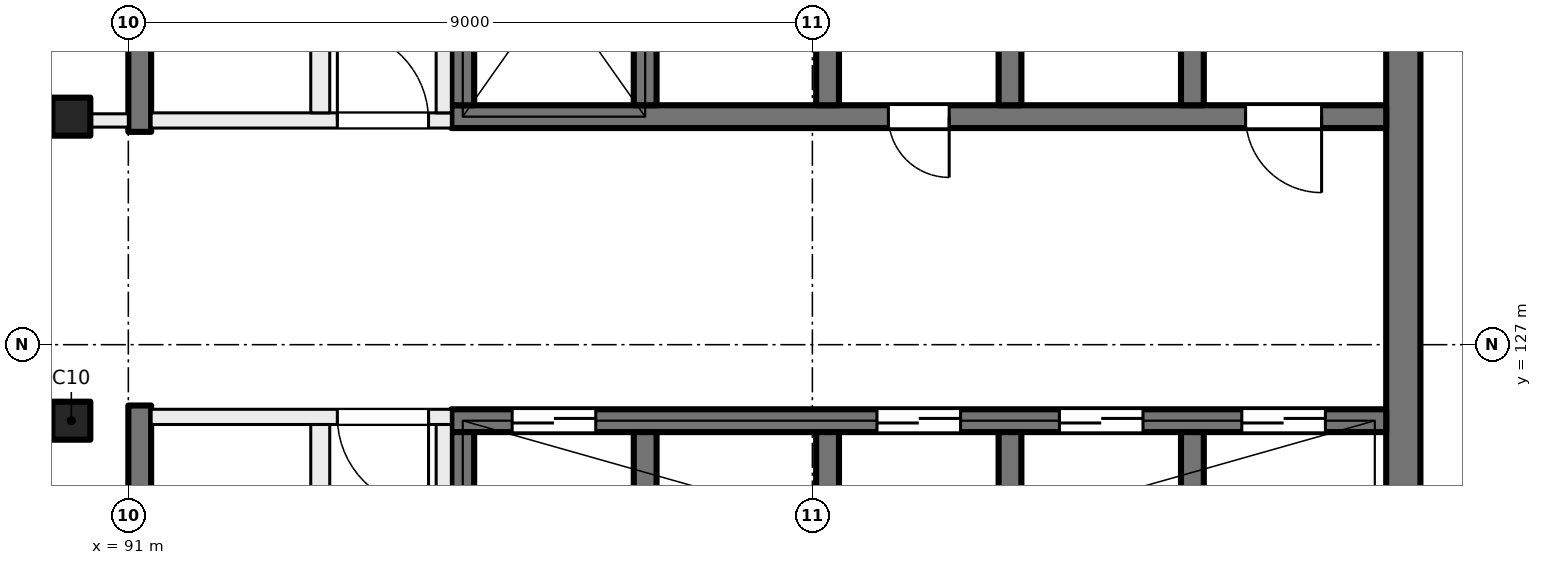
"""IFC4 building model, lengths in metres.
Left out: names, types, materials, properties, quantities, classifications, styles, units other than length and angle.
Written with IfcOpenShell. Run it as: python <this file> out.ifc"""

import sys

from ifc_helpers import new_model, si_unit, direction, frame, frame_2d, origin, origin_2d, place, context, subcontext, project, spatial, rectangle, extrude, element, fill, save


model = new_model("IFC4")
c1 = context("Model", 3, precision=1e-05, world=origin(), true_north=direction((0.0, 1.0)))
c2 = subcontext(c1, "Body", "Model", "MODEL_VIEW")
j1 = project(units=[si_unit("LENGTHUNIT", "METRE"), si_unit("PLANEANGLEUNIT", "RADIAN")], contexts=[c1])
p1 = place(None, origin())
s1 = spatial("IfcSite", under=j1, at=p1, CompositionType="ELEMENT")
p2 = place(p1, origin())
s2 = spatial("IfcBuilding", under=s1, at=p2, CompositionType="ELEMENT")
p3 = place(p2, frame((0.0, 0.0, 249.5)))
s3 = spatial("IfcBuildingStorey", under=s2, at=p3, CompositionType="ELEMENT", Elevation=249.5)
for number, where, z_axis, x_axis in (
    (1, (90.25, 130.0, 0.0), (0.0, 0.0, 1.0), (1.0, 0.0, 0.0)),
    (2, (90.25, 126.0, 0.0), (0.0, 0.0, 1.0), (1.0, 0.0, 0.0)),
):
    element("IfcColumn", number, at=place(p3, frame(where, z_axis=z_axis, x_axis=x_axis)), inside=s3, PredefinedType="COLUMN", context=c2, shape_type="SweptSolid", body=[
        extrude(rectangle(XDim=0.5, YDim=0.5, at=origin_2d()), origin(), (0.0, 0.0, 1.0), 4.0),
    ])
p4 = place(p3, frame((107.775, 135.2, 0.0), z_axis=(0.0, 0.0, 1.0), x_axis=(0.0, -1.0, 0.0)))
e3 = element("IfcWall", 3, at=p4, inside=s3, PredefinedType="SHEAR", context=c2, shape_type="SweptSolid", body=[
    extrude(rectangle(XDim=14.4, YDim=0.45, at=frame_2d((7.2, 0.0))), origin(), (0.0, 0.0, 1.0), 4.0),
])
p5 = place(p3, frame((107.55, 130.0, 0.0), z_axis=(0.0, 0.0, 1.0), x_axis=(-1.0, 0.0, 0.0)))
e4 = element("IfcWall", 4, at=p5, inside=s3, PredefinedType="SHEAR", context=c2, shape_type="SweptSolid", body=[
    extrude(rectangle(XDim=12.3, YDim=0.3, at=frame_2d((6.15, 0.0))), origin(), (0.0, 0.0, 1.0), 4.0),
])
p6 = place(p5, frame((0.85, 0.0, 0.0)))
e5 = element("IfcOpeningElement", 5, at=p6, cuts=e4, PredefinedType="OPENING", context=c2, shape_type="SweptSolid", body=[
    extrude(rectangle(XDim=1.0, YDim=2.1, at=frame_2d((0.5, 1.05))), frame((0.0, 0.16, 0.0), z_axis=(0.0, -1.0, 0.0), x_axis=(1.0, 0.0, 0.0)), (0.0, 0.0, 1.0), 0.32),
])
p7 = place(p5, frame((5.75, 0.0, 0.0)))
e6 = element("IfcOpeningElement", 6, at=p7, cuts=e4, PredefinedType="OPENING", context=c2, shape_type="SweptSolid", body=[
    extrude(rectangle(XDim=0.8, YDim=2.1, at=frame_2d((0.4, 1.05))), frame((0.0, 0.16, 0.0), z_axis=(0.0, -1.0, 0.0), x_axis=(1.0, 0.0, 0.0)), (0.0, 0.0, 1.0), 0.32),
])
for number, where, z_axis, x_axis in (
    (7, (105.0, 133.25, 0.0), (0.0, 0.0, 1.0), (0.0, -1.0, 0.0)),
    (8, (102.6, 133.25, 0.0), (0.0, 0.0, 1.0), (0.0, -1.0, 0.0)),
    (9, (100.2, 133.25, 0.0), (0.0, 0.0, 1.0), (0.0, -1.0, 0.0)),
    (10, (97.8, 133.25, 0.0), (0.0, 0.0, 1.0), (0.0, -1.0, 0.0)),
    (11, (95.4, 133.25, 0.0), (0.0, 0.0, 1.0), (0.0, -1.0, 0.0)),
):
    element("IfcWall", number, at=place(p3, frame(where, z_axis=z_axis, x_axis=x_axis)), inside=s3, PredefinedType="SHEAR", context=c2, shape_type="SweptSolid", body=[
        extrude(rectangle(XDim=3.1, YDim=0.3, at=frame_2d((1.55, 0.0))), origin(), (0.0, 0.0, 1.0), 4.0),
    ])
p8 = place(p3, frame((107.55, 126.0, 0.0), z_axis=(0.0, 0.0, 1.0), x_axis=(-1.0, 0.0, 0.0)))
e12 = element("IfcWall", 12, at=p8, inside=s3, PredefinedType="SHEAR", context=c2, shape_type="SweptSolid", body=[
    extrude(rectangle(XDim=12.3, YDim=0.3, at=frame_2d((6.15, 0.0))), origin(), (0.0, 0.0, 1.0), 4.0),
])
p9 = place(p8, frame((0.8, 0.0, 0.0)))
e13 = element("IfcOpeningElement", 13, at=p9, cuts=e12, PredefinedType="OPENING", context=c2, shape_type="SweptSolid", body=[
    extrude(rectangle(XDim=1.1, YDim=2.1, at=frame_2d((0.55, 1.05))), frame((0.0, 0.16, 0.0), z_axis=(0.0, -1.0, 0.0), x_axis=(1.0, 0.0, 0.0)), (0.0, 0.0, 1.0), 0.32),
])
p10 = place(p8, frame((3.2, 0.0, 0.0)))
e14 = element("IfcOpeningElement", 14, at=p10, cuts=e12, PredefinedType="OPENING", context=c2, shape_type="SweptSolid", body=[
    extrude(rectangle(XDim=1.1, YDim=2.1, at=frame_2d((0.55, 1.05))), frame((0.0, 0.16, 0.0), z_axis=(0.0, -1.0, 0.0), x_axis=(1.0, 0.0, 0.0)), (0.0, 0.0, 1.0), 0.32),
])
p11 = place(p8, frame((5.6, 0.0, 0.0)))
e15 = element("IfcOpeningElement", 15, at=p11, cuts=e12, PredefinedType="OPENING", context=c2, shape_type="SweptSolid", body=[
    extrude(rectangle(XDim=1.1, YDim=2.1, at=frame_2d((0.55, 1.05))), frame((0.0, 0.16, 0.0), z_axis=(0.0, -1.0, 0.0), x_axis=(1.0, 0.0, 0.0)), (0.0, 0.0, 1.0), 0.32),
])
p12 = place(p8, frame((10.4, 0.0, 0.0)))
e16 = element("IfcOpeningElement", 16, at=p12, cuts=e12, PredefinedType="OPENING", context=c2, shape_type="SweptSolid", body=[
    extrude(rectangle(XDim=1.1, YDim=2.1, at=frame_2d((0.55, 1.05))), frame((0.0, 0.16, 0.0), z_axis=(0.0, -1.0, 0.0), x_axis=(1.0, 0.0, 0.0)), (0.0, 0.0, 1.0), 0.32),
])
for number, where, z_axis, x_axis in (
    (17, (105.0, 125.85, 0.0), (0.0, 0.0, 1.0), (0.0, -1.0, 0.0)),
    (18, (102.6, 125.85, 0.0), (0.0, 0.0, 1.0), (0.0, -1.0, 0.0)),
    (19, (100.2, 125.85, 0.0), (0.0, 0.0, 1.0), (0.0, -1.0, 0.0)),
    (20, (97.8, 125.85, 0.0), (0.0, 0.0, 1.0), (0.0, -1.0, 0.0)),
    (21, (95.4, 125.85, 0.0), (0.0, 0.0, 1.0), (0.0, -1.0, 0.0)),
):
    element("IfcWall", number, at=place(p3, frame(where, z_axis=z_axis, x_axis=x_axis)), inside=s3, PredefinedType="SHEAR", context=c2, shape_type="SweptSolid", body=[
        extrude(rectangle(XDim=3.1, YDim=0.3, at=frame_2d((1.55, 0.0))), origin(), (0.0, 0.0, 1.0), 4.0),
    ])
for number, where, z_axis, x_axis in (
    (22, (91.15, 138.55, 0.0), (0.0, 0.0, 1.0), (0.0, -1.0, 0.0)),
    (23, (91.15, 126.2, 0.0), (0.0, 0.0, 1.0), (0.0, -1.0, 0.0)),
):
    element("IfcWall", number, at=place(p3, frame(where, z_axis=z_axis, x_axis=x_axis)), inside=s3, PredefinedType="SHEAR", context=c2, shape_type="SweptSolid", body=[
        extrude(rectangle(XDim=8.75, YDim=0.3, at=frame_2d((4.375, 0.0))), origin(), (0.0, 0.0, 1.0), 4.0),
    ])
p13 = place(p3, frame((95.25, 126.05, 0.0), z_axis=(0.0, 0.0, 1.0), x_axis=(-1.0, 0.0, 0.0)))
e24 = element("IfcWall", 24, at=p13, inside=s3, PredefinedType="PARTITIONING", context=c2, shape_type="SweptSolid", body=[
    extrude(rectangle(XDim=3.95, YDim=0.2, at=frame_2d((1.975, 0.0))), origin(), (0.0, 0.0, 1.0), 3.625),
])
p14 = place(p13, frame((0.3, 0.0, 0.0)))
e25 = element("IfcOpeningElement", 25, at=p14, cuts=e24, PredefinedType="OPENING", context=c2, shape_type="SweptSolid", body=[
    extrude(rectangle(XDim=1.2, YDim=2.1, at=frame_2d((0.6, 1.05))), frame((0.0, 0.11, 0.0), z_axis=(0.0, -1.0, 0.0), x_axis=(1.0, 0.0, 0.0)), (0.0, 0.0, 1.0), 0.22),
])
p15 = place(p3, frame((95.15, 117.45, 0.0), z_axis=(0.0, 0.0, 1.0), x_axis=(0.0, 1.0, 0.0)))
e26 = element("IfcWall", 26, at=p15, inside=s3, PredefinedType="PARTITIONING", context=c2, shape_type="SweptSolid", body=[
    extrude(rectangle(XDim=8.5, YDim=0.2, at=frame_2d((4.25, 0.0))), origin(), (0.0, 0.0, 1.0), 3.625),
])
p16 = place(p15, frame((1.75, 0.0, 0.0)))
e27 = element("IfcOpeningElement", 27, at=p16, cuts=e26, PredefinedType="OPENING", context=c2, shape_type="SweptSolid", body=[
    extrude(rectangle(XDim=1.5, YDim=2.1, at=frame_2d((0.75, 1.05))), frame((0.0, 0.11, 0.0), z_axis=(0.0, -1.0, 0.0), x_axis=(1.0, 0.0, 0.0)), (0.0, 0.0, 1.0), 0.22),
])
p17 = place(p3, frame((93.525, 117.45, 0.0), z_axis=(0.0, 0.0, 1.0), x_axis=(0.0, 1.0, 0.0)))
e28 = element("IfcWall", 28, at=p17, inside=s3, PredefinedType="PARTITIONING", context=c2, shape_type="SweptSolid", body=[
    extrude(rectangle(XDim=8.5, YDim=0.25, at=frame_2d((4.25, 0.0))), origin(), (0.0, 0.0, 1.0), 3.625),
])
p18 = place(p17, frame((5.29, 0.0, 0.0)))
e29 = element("IfcOpeningElement", 29, at=p18, cuts=e28, PredefinedType="OPENING", context=c2, shape_type="SweptSolid", body=[
    extrude(rectangle(XDim=0.8, YDim=2.1, at=frame_2d((0.4, 1.05))), frame((0.0, 0.135, 0.0), z_axis=(0.0, -1.0, 0.0), x_axis=(1.0, 0.0, 0.0)), (0.0, 0.0, 1.0), 0.27),
])
p19 = place(p17, frame((0.99, 0.0, 0.0)))
e30 = element("IfcOpeningElement", 30, at=p19, cuts=e28, PredefinedType="OPENING", context=c2, shape_type="SweptSolid", body=[
    extrude(rectangle(XDim=0.8, YDim=2.1, at=frame_2d((0.4, 1.05))), frame((0.0, 0.135, 0.0), z_axis=(0.0, -1.0, 0.0), x_axis=(1.0, 0.0, 0.0)), (0.0, 0.0, 1.0), 0.27),
])
p20 = place(p3, frame((91.3, 129.95, 0.0), z_axis=(0.0, 0.0, 1.0), x_axis=(1.0, 0.0, 0.0)))
e31 = element("IfcWall", 31, at=p20, inside=s3, PredefinedType="PARTITIONING", context=c2, shape_type="SweptSolid", body=[
    extrude(rectangle(XDim=3.95, YDim=0.2, at=frame_2d((1.975, 0.0))), origin(), (0.0, 0.0, 1.0), 3.625),
])
p21 = place(p20, frame((2.45, 0.0, 0.0)))
e32 = element("IfcOpeningElement", 32, at=p21, cuts=e31, PredefinedType="OPENING", context=c2, shape_type="SweptSolid", body=[
    extrude(rectangle(XDim=1.2, YDim=2.1, at=frame_2d((0.6, 1.05))), frame((0.0, 0.11, 0.0), z_axis=(0.0, -1.0, 0.0), x_axis=(1.0, 0.0, 0.0)), (0.0, 0.0, 1.0), 0.22),
])
p22 = place(p3, frame((95.15, 130.05, 0.0), z_axis=(0.0, 0.0, 1.0), x_axis=(0.0, 1.0, 0.0)))
e33 = element("IfcWall", 33, at=p22, inside=s3, PredefinedType="PARTITIONING", context=c2, shape_type="SweptSolid", body=[
    extrude(rectangle(XDim=8.5, YDim=0.2, at=frame_2d((4.25, 0.0))), origin(), (0.0, 0.0, 1.0), 3.625),
])
p23 = place(p22, frame((5.25, 0.0, 0.0)))
e34 = element("IfcOpeningElement", 34, at=p23, cuts=e33, PredefinedType="OPENING", context=c2, shape_type="SweptSolid", body=[
    extrude(rectangle(XDim=1.5, YDim=2.1, at=frame_2d((0.75, 1.05))), frame((0.0, 0.11, 0.0), z_axis=(0.0, -1.0, 0.0), x_axis=(1.0, 0.0, 0.0)), (0.0, 0.0, 1.0), 0.22),
])
p24 = place(p3, frame((93.525, 130.05, 0.0), z_axis=(0.0, 0.0, 1.0), x_axis=(0.0, 1.0, 0.0)))
e35 = element("IfcWall", 35, at=p24, inside=s3, PredefinedType="PARTITIONING", context=c2, shape_type="SweptSolid", body=[
    extrude(rectangle(XDim=8.5, YDim=0.25, at=frame_2d((4.25, 0.0))), origin(), (0.0, 0.0, 1.0), 3.625),
])
p25 = place(p24, frame((1.6, 0.0, 0.0)))
e36 = element("IfcOpeningElement", 36, at=p25, cuts=e35, PredefinedType="OPENING", context=c2, shape_type="SweptSolid", body=[
    extrude(rectangle(XDim=1.0, YDim=2.1, at=frame_2d((0.5, 1.05))), frame((0.0, 0.135, 0.0), z_axis=(0.0, -1.0, 0.0), x_axis=(1.0, 0.0, 0.0)), (0.0, 0.0, 1.0), 0.27),
])
p26 = place(p24, frame((6.0, 0.0, 0.0)))
e37 = element("IfcOpeningElement", 37, at=p26, cuts=e35, PredefinedType="OPENING", context=c2, shape_type="SweptSolid", body=[
    extrude(rectangle(XDim=0.8, YDim=2.1, at=frame_2d((0.4, 1.05))), frame((0.0, 0.135, 0.0), z_axis=(0.0, -1.0, 0.0), x_axis=(1.0, 0.0, 0.0)), (0.0, 0.0, 1.0), 0.27),
])
p27 = place(p3, frame((85.838, 129.95, 0.0), z_axis=(0.0, 0.0, 1.0), x_axis=(1.0, 0.0, 0.0)))
e38 = element("IfcWall", 38, at=p27, inside=s3, PredefinedType="PARTITIONING", context=c2, shape_type="SweptSolid", body=[
    extrude(rectangle(XDim=5.162, YDim=0.175, at=frame_2d((2.581, 0.0))), origin(), (0.0, 0.0, 1.0), 3.625),
])
p28 = place(p27, frame((1.971, 0.0, 0.0)))
e39 = element("IfcOpeningElement", 39, at=p28, cuts=e38, PredefinedType="OPENING", context=c2, shape_type="SweptSolid", body=[
    extrude(rectangle(XDim=1.2, YDim=2.1, at=frame_2d((0.6, 1.05))), frame((0.0, 0.097, 0.0), z_axis=(0.0, -1.0, 0.0), x_axis=(1.0, 0.0, 0.0)), (0.0, 0.0, 1.0), 0.195),
])
p29 = place(p9, origin())
e40 = element("IfcDoor", 40, at=p29, inside=s3, OperationType="DOUBLE_DOOR_SLIDING", PredefinedType="DOOR", context=c2, shape_type="SweptSolid", body=[
    extrude(rectangle(XDim=1.1, YDim=2.1, at=frame_2d((0.55, 1.05))), frame((0.0, 0.025, 0.0), z_axis=(0.0, -1.0, 0.0), x_axis=(1.0, 0.0, 0.0)), (0.0, 0.0, 1.0), 0.05),
])
fill(e13, e40)
p30 = place(p10, origin())
e41 = element("IfcDoor", 41, at=p30, inside=s3, OperationType="DOUBLE_DOOR_SLIDING", PredefinedType="DOOR", context=c2, shape_type="SweptSolid", body=[
    extrude(rectangle(XDim=1.1, YDim=2.1, at=frame_2d((0.55, 1.05))), frame((0.0, 0.025, 0.0), z_axis=(0.0, -1.0, 0.0), x_axis=(1.0, 0.0, 0.0)), (0.0, 0.0, 1.0), 0.05),
])
fill(e14, e41)
p31 = place(p11, origin())
e42 = element("IfcDoor", 42, at=p31, inside=s3, OperationType="DOUBLE_DOOR_SLIDING", PredefinedType="DOOR", context=c2, shape_type="SweptSolid", body=[
    extrude(rectangle(XDim=1.1, YDim=2.1, at=frame_2d((0.55, 1.05))), frame((0.0, 0.025, 0.0), z_axis=(0.0, -1.0, 0.0), x_axis=(1.0, 0.0, 0.0)), (0.0, 0.0, 1.0), 0.05),
])
fill(e15, e42)
p32 = place(p12, origin())
e43 = element("IfcDoor", 43, at=p32, inside=s3, OperationType="DOUBLE_DOOR_SLIDING", PredefinedType="DOOR", context=c2, shape_type="SweptSolid", body=[
    extrude(rectangle(XDim=1.1, YDim=2.1, at=frame_2d((0.55, 1.05))), frame((0.0, 0.025, 0.0), z_axis=(0.0, -1.0, 0.0), x_axis=(1.0, 0.0, 0.0)), (0.0, 0.0, 1.0), 0.05),
])
fill(e16, e43)
p33 = place(p6, origin())
e44 = element("IfcDoor", 44, at=p33, inside=s3, OperationType="SINGLE_SWING_LEFT", PredefinedType="DOOR", context=c2, shape_type="SweptSolid", body=[
    extrude(rectangle(XDim=1.0, YDim=2.1, at=frame_2d((0.5, 1.05))), frame((0.0, 0.025, 0.0), z_axis=(0.0, -1.0, 0.0), x_axis=(1.0, 0.0, 0.0)), (0.0, 0.0, 1.0), 0.05),
])
fill(e5, e44)
p34 = place(p7, origin())
e45 = element("IfcDoor", 45, at=p34, inside=s3, OperationType="SINGLE_SWING_RIGHT", PredefinedType="DOOR", context=c2, shape_type="SweptSolid", body=[
    extrude(rectangle(XDim=0.8, YDim=2.1, at=frame_2d((0.4, 1.05))), frame((0.0, 0.025, 0.0), z_axis=(0.0, -1.0, 0.0), x_axis=(1.0, 0.0, 0.0)), (0.0, 0.0, 1.0), 0.05),
])
fill(e6, e45)
p35 = place(p14, origin())
e46 = element("IfcDoor", 46, at=p35, inside=s3, OperationType="DOUBLE_DOOR_SINGLE_SWING", PredefinedType="DOOR", context=c2, shape_type="SweptSolid", body=[
    extrude(rectangle(XDim=1.2, YDim=2.1, at=frame_2d((0.6, 1.05))), frame((0.0, 0.025, 0.0), z_axis=(0.0, -1.0, 0.0), x_axis=(1.0, 0.0, 0.0)), (0.0, 0.0, 1.0), 0.05),
])
fill(e25, e46)
p36 = place(p21, origin())
e47 = element("IfcDoor", 47, at=p36, inside=s3, OperationType="DOUBLE_DOOR_SINGLE_SWING", PredefinedType="DOOR", context=c2, shape_type="SweptSolid", body=[
    extrude(rectangle(XDim=1.2, YDim=2.1, at=frame_2d((0.6, 1.05))), frame((0.0, 0.025, 0.0), z_axis=(0.0, -1.0, 0.0), x_axis=(1.0, 0.0, 0.0)), (0.0, 0.0, 1.0), 0.05),
])
fill(e32, e47)
save(model, sys.argv[1])
